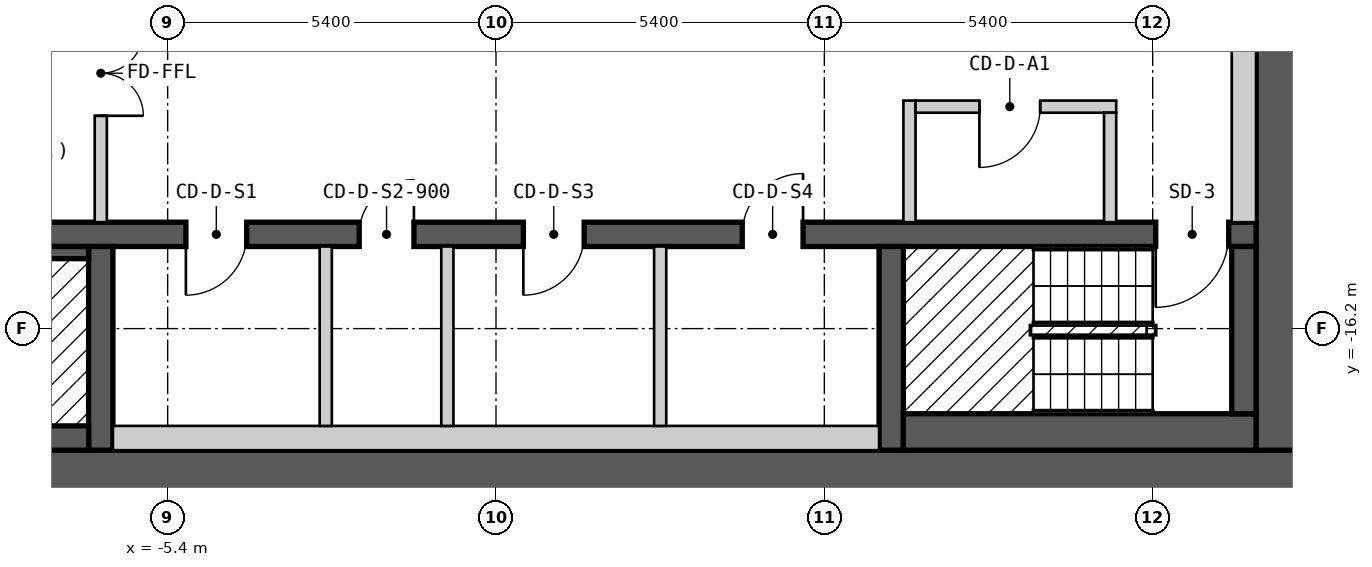
"""IFC4 building model, lengths in metres.
Left out: names, types, materials, properties, quantities, classifications, styles, units other than length and angle.
Written with IfcOpenShell. Run it as: python <this file> out.ifc"""

import sys

from ifc_helpers import new_model, si_unit, direction, frame, frame_2d, origin, place, context, subcontext, project, spatial, rectangle, extrude, element, fill, save


model = new_model("IFC4")
c1 = context("Model", 3, precision=1e-05, world=origin(), true_north=direction((0.0, 1.0)))
c2 = subcontext(c1, "Body", "Model", "MODEL_VIEW")
j1 = project(units=[si_unit("LENGTHUNIT", "METRE"), si_unit("PLANEANGLEUNIT", "RADIAN")], contexts=[c1])
p1 = place(None, origin())
s1 = spatial("IfcSite", under=j1, at=p1, CompositionType="ELEMENT")
p2 = place(p1, origin())
s2 = spatial("IfcBuilding", under=s1, at=p2, CompositionType="ELEMENT")
p3 = place(p2, frame((0.0, 0.0, 129.6)))
s3 = spatial("IfcBuildingStorey", under=s2, at=p3, CompositionType="ELEMENT", Elevation=129.6)
p4 = place(p3, frame((-13.3, -18.6, 0.0), z_axis=(0.0, 0.0, 1.0), x_axis=(1.0, 0.0, 0.0)))
e1 = element("IfcWall", 1, at=p4, inside=s3, PredefinedType="SHEAR", context=c2, shape_type="SweptSolid", body=[
    extrude(rectangle(XDim=26.6, YDim=0.8, at=frame_2d((13.3, 0.0))), origin(), (0.0, 0.0, 1.0), 2.7),
])
p5 = place(p3, frame((12.9, -18.2, 0.0), z_axis=(0.0, 0.0, 1.0), x_axis=(0.0, 1.0, 0.0)))
e2 = element("IfcWall", 2, at=p5, inside=s3, PredefinedType="SHEAR", context=c2, shape_type="SweptSolid", body=[
    extrude(rectangle(XDim=12.4, YDim=0.8, at=frame_2d((6.2, 0.0))), origin(), (0.0, 0.0, 1.0), 2.7),
])
p6 = place(p3, frame((-12.5, -14.65, 0.0), z_axis=(0.0, 0.0, 1.0), x_axis=(1.0, 0.0, 0.0)))
e3 = element("IfcWall", 3, at=p6, inside=s3, PredefinedType="SHEAR", context=c2, shape_type="SweptSolid", body=[
    extrude(rectangle(XDim=25.0, YDim=0.4, at=frame_2d((12.5, 0.0))), origin(), (0.0, 0.0, 1.0), 2.7),
])
p7 = place(p6, frame((1.7, 0.0, 0.0), z_axis=(0.0, 0.0, 1.0), x_axis=(-1.0, 0.0, 0.0)))
e4 = element("IfcOpeningElement", 4, at=p7, cuts=e3, PredefinedType="OPENING", context=c2, shape_type="SweptSolid", body=[
    extrude(rectangle(XDim=1.2, YDim=2.1, at=frame_2d((0.6, 1.05))), frame((0.0, 0.21, 0.0), z_axis=(0.0, -1.0, 0.0), x_axis=(1.0, 0.0, 0.0)), (0.0, 0.0, 1.0), 0.42),
])
p8 = place(p6, frame((24.55, 0.0, 0.0), z_axis=(0.0, 0.0, 1.0), x_axis=(-1.0, 0.0, 0.0)))
e5 = element("IfcOpeningElement", 5, at=p8, cuts=e3, PredefinedType="OPENING", context=c2, shape_type="SweptSolid", body=[
    extrude(rectangle(XDim=1.2, YDim=2.1, at=frame_2d((0.6, 1.05))), frame((0.0, 0.21, 0.0), z_axis=(0.0, -1.0, 0.0), x_axis=(1.0, 0.0, 0.0)), (0.0, 0.0, 1.0), 0.42),
])
p9 = place(p6, frame((8.4, 0.0, 0.0), z_axis=(0.0, 0.0, 1.0), x_axis=(-1.0, 0.0, 0.0)))
e6 = element("IfcOpeningElement", 6, at=p9, cuts=e3, PredefinedType="OPENING", context=c2, shape_type="SweptSolid", body=[
    extrude(rectangle(XDim=1.0, YDim=2.1, at=frame_2d((0.5, 1.05))), frame((0.0, 0.21, 0.0), z_axis=(0.0, -1.0, 0.0), x_axis=(1.0, 0.0, 0.0)), (0.0, 0.0, 1.0), 0.42),
])
p10 = place(p6, frame((11.15, 0.0, 0.0), z_axis=(0.0, 0.0, 1.0), x_axis=(-1.0, 0.0, 0.0)))
e7 = element("IfcOpeningElement", 7, at=p10, cuts=e3, PredefinedType="OPENING", context=c2, shape_type="SweptSolid", body=[
    extrude(rectangle(XDim=0.9, YDim=2.1, at=frame_2d((0.45, 1.05))), frame((0.0, 0.21, 0.0), z_axis=(0.0, -1.0, 0.0), x_axis=(1.0, 0.0, 0.0)), (0.0, 0.0, 1.0), 0.42),
])
p11 = place(p6, frame((13.95, 0.0, 0.0), z_axis=(0.0, 0.0, 1.0), x_axis=(-1.0, 0.0, 0.0)))
e8 = element("IfcOpeningElement", 8, at=p11, cuts=e3, PredefinedType="OPENING", context=c2, shape_type="SweptSolid", body=[
    extrude(rectangle(XDim=1.0, YDim=2.1, at=frame_2d((0.5, 1.05))), frame((0.0, 0.21, 0.0), z_axis=(0.0, -1.0, 0.0), x_axis=(1.0, 0.0, 0.0)), (0.0, 0.0, 1.0), 0.42),
])
p12 = place(p6, frame((17.55, 0.0, 0.0), z_axis=(0.0, 0.0, 1.0), x_axis=(-1.0, 0.0, 0.0)))
e9 = element("IfcOpeningElement", 9, at=p12, cuts=e3, PredefinedType="OPENING", context=c2, shape_type="SweptSolid", body=[
    extrude(rectangle(XDim=1.0, YDim=2.1, at=frame_2d((0.5, 1.05))), frame((0.0, 0.21, 0.0), z_axis=(0.0, -1.0, 0.0), x_axis=(1.0, 0.0, 0.0)), (0.0, 0.0, 1.0), 0.42),
])
for number, where, z_axis, x_axis in (
    (10, (-6.5, -18.2, 0.0), (0.0, 0.0, 1.0), (0.0, 1.0, 0.0)),
    (11, (6.5, -18.2, 0.0), (0.0, 0.0, 1.0), (0.0, 1.0, 0.0)),
):
    element("IfcWall", number, at=place(p3, frame(where, z_axis=z_axis, x_axis=x_axis)), inside=s3, PredefinedType="SHEAR", context=c2, shape_type="SweptSolid", body=[
        extrude(rectangle(XDim=3.35, YDim=0.4, at=frame_2d((1.675, 0.0))), origin(), (0.0, 0.0, 1.0), 2.7),
    ])
p13 = place(p3, frame((-12.1, -18.0, 0.0), z_axis=(0.0, 0.0, 1.0), x_axis=(1.0, 0.0, 0.0)))
e12 = element("IfcWall", 12, at=p13, inside=s3, PredefinedType="SOLIDWALL", context=c2, shape_type="SweptSolid", body=[
    extrude(rectangle(XDim=5.4, YDim=0.4, at=frame_2d((2.7, 0.0))), origin(), (0.0, 0.0, 1.0), 2.7),
])
p14 = place(p3, frame((-10.8, -14.95, 0.0), z_axis=(0.0, 0.0, 1.0), x_axis=(1.0, 0.0, 0.0)))
e13 = element("IfcWall", 13, at=p14, inside=s3, PredefinedType="SOLIDWALL", context=c2, shape_type="SweptSolid", body=[
    extrude(rectangle(XDim=4.1, YDim=0.2, at=frame_2d((2.05, 0.0))), origin(), (0.0, 0.0, 1.0), 2.7),
])
p15 = place(p3, frame((-6.5, -14.45, 0.0), z_axis=(0.0, 0.0, 1.0), x_axis=(0.0, 1.0, 0.0)))
e14 = element("IfcWall", 14, at=p15, inside=s3, PredefinedType="PARTITIONING", context=c2, shape_type="SweptSolid", body=[
    extrude(rectangle(XDim=4.9, YDim=0.2, at=frame_2d((2.45, 0.0))), origin(), (0.0, 0.0, 1.0), 2.7),
])
p16 = place(p15, frame((3.15, 0.0, 0.0), z_axis=(0.0, 0.0, 1.0), x_axis=(-1.0, 0.0, 0.0)))
e15 = element("IfcOpeningElement", 15, at=p16, cuts=e14, PredefinedType="OPENING", context=c2, shape_type="SweptSolid", body=[
    extrude(rectangle(XDim=1.4, YDim=2.1, at=frame_2d((0.7, 1.05))), frame((0.0, 0.11, 0.0), z_axis=(0.0, -1.0, 0.0), x_axis=(1.0, 0.0, 0.0)), (0.0, 0.0, 1.0), 0.22),
])
p17 = place(p3, frame((-6.3, -18.0, 0.0), z_axis=(0.0, 0.0, 1.0), x_axis=(1.0, 0.0, 0.0)))
e16 = element("IfcWall", 16, at=p17, inside=s3, PredefinedType="PARTITIONING", context=c2, shape_type="SweptSolid", body=[
    extrude(rectangle(XDim=12.6, YDim=0.4, at=frame_2d((6.3, 0.0))), origin(), (0.0, 0.0, 1.0), 2.7),
])
for number, where, z_axis, x_axis in (
    (17, (-2.8, -17.8, 0.0), (0.0, 0.0, 1.0), (0.0, 1.0, 0.0)),
    (18, (-0.8, -17.8, 0.0), (0.0, 0.0, 1.0), (0.0, 1.0, 0.0)),
    (19, (2.7, -17.8, 0.0), (0.0, 0.0, 1.0), (0.0, 1.0, 0.0)),
):
    element("IfcWall", number, at=place(p3, frame(where, z_axis=z_axis, x_axis=x_axis)), inside=s3, PredefinedType="PARTITIONING", context=c2, shape_type="SweptSolid", body=[
        extrude(rectangle(XDim=2.95, YDim=0.2, at=frame_2d((1.475, 0.0))), origin(), (0.0, 0.0, 1.0), 2.7),
    ])
p18 = place(p3, frame((6.7, -17.9, 0.0), z_axis=(0.0, 0.0, 1.0), x_axis=(1.0, 0.0, 0.0)))
e20 = element("IfcWall", 20, at=p18, inside=s3, PredefinedType="SOLIDWALL", context=c2, shape_type="SweptSolid", body=[
    extrude(rectangle(XDim=5.8, YDim=0.6, at=frame_2d((2.9, 0.0))), origin(), (0.0, 0.0, 1.0), 2.7),
])
p19 = place(p3, frame((6.8, -14.45, 0.0), z_axis=(0.0, 0.0, 1.0), x_axis=(0.0, 1.0, 0.0)))
e21 = element("IfcWall", 21, at=p19, inside=s3, PredefinedType="PARTITIONING", context=c2, shape_type="SweptSolid", body=[
    extrude(rectangle(XDim=2.0, YDim=0.2, at=frame_2d((1.0, 0.0))), origin(), (0.0, 0.0, 1.0), 2.7),
])
p20 = place(p3, frame((6.9, -12.55, 0.0), z_axis=(0.0, 0.0, 1.0), x_axis=(1.0, 0.0, 0.0)))
e22 = element("IfcWall", 22, at=p20, inside=s3, PredefinedType="PARTITIONING", context=c2, shape_type="SweptSolid", body=[
    extrude(rectangle(XDim=3.3, YDim=0.2, at=frame_2d((1.65, 0.0))), origin(), (0.0, 0.0, 1.0), 2.7),
])
p21 = place(p20, frame((2.05, 0.0, 0.0), z_axis=(0.0, 0.0, 1.0), x_axis=(-1.0, 0.0, 0.0)))
e23 = element("IfcOpeningElement", 23, at=p21, cuts=e22, PredefinedType="OPENING", context=c2, shape_type="SweptSolid", body=[
    extrude(rectangle(XDim=1.0, YDim=2.1, at=frame_2d((0.5, 1.05))), frame((0.0, 0.11, 0.0), z_axis=(0.0, -1.0, 0.0), x_axis=(1.0, 0.0, 0.0)), (0.0, 0.0, 1.0), 0.22),
])
p22 = place(p3, frame((10.1, -14.45, 0.0), z_axis=(0.0, 0.0, 1.0), x_axis=(0.0, 1.0, 0.0)))
e24 = element("IfcWall", 24, at=p22, inside=s3, PredefinedType="PARTITIONING", context=c2, shape_type="SweptSolid", body=[
    extrude(rectangle(XDim=1.8, YDim=0.2, at=frame_2d((0.9, 0.0))), origin(), (0.0, 0.0, 1.0), 2.7),
])
p23 = place(p3, frame((12.3, -17.6, 0.0), z_axis=(0.0, 0.0, 1.0), x_axis=(0.0, 1.0, 0.0)))
e25 = element("IfcWall", 25, at=p23, inside=s3, PredefinedType="SOLIDWALL", context=c2, shape_type="SweptSolid", body=[
    extrude(rectangle(XDim=2.75, YDim=0.4, at=frame_2d((1.375, 0.0))), origin(), (0.0, 0.0, 1.0), 2.7),
])
p24 = place(p3, frame((12.3, -14.45, 0.0), z_axis=(0.0, 0.0, 1.0), x_axis=(0.0, 1.0, 0.0)))
e26 = element("IfcWall", 26, at=p24, inside=s3, PredefinedType="PARTITIONING", context=c2, shape_type="SweptSolid", body=[
    extrude(rectangle(XDim=8.25, YDim=0.4, at=frame_2d((4.125, 0.0))), origin(), (0.0, 0.0, 1.0), 2.7),
])
p25 = place(p8, origin())
e27 = element("IfcDoor", 27, at=p25, inside=s3, OperationType="SINGLE_SWING_RIGHT", PredefinedType="DOOR", context=c2, shape_type="SweptSolid", body=[
    extrude(rectangle(XDim=1.2, YDim=2.1, at=frame_2d((0.6, 1.05))), frame((0.0, 0.025, 0.0), z_axis=(0.0, -1.0, 0.0), x_axis=(1.0, 0.0, 0.0)), (0.0, 0.0, 1.0), 0.05),
])
fill(e5, e27)
p26 = place(p16, origin())
e28 = element("IfcDoor", 28, at=p26, inside=s3, OperationType="DOUBLE_DOOR_SINGLE_SWING", PredefinedType="DOOR", context=c2, shape_type="SweptSolid", body=[
    extrude(rectangle(XDim=1.4, YDim=2.1, at=frame_2d((0.7, 1.05))), frame((0.0, 0.025, 0.0), z_axis=(0.0, -1.0, 0.0), x_axis=(1.0, 0.0, 0.0)), (0.0, 0.0, 1.0), 0.05),
])
fill(e15, e28)
p27 = place(p21, origin())
e29 = element("IfcDoor", 29, at=p27, inside=s3, OperationType="SINGLE_SWING_RIGHT", PredefinedType="DOOR", context=c2, shape_type="SweptSolid", body=[
    extrude(rectangle(XDim=1.0, YDim=2.1, at=frame_2d((0.5, 1.05))), frame((0.0, 0.025, 0.0), z_axis=(0.0, -1.0, 0.0), x_axis=(1.0, 0.0, 0.0)), (0.0, 0.0, 1.0), 0.05),
])
fill(e23, e29)
p28 = place(p9, origin())
e30 = element("IfcDoor", 30, at=p28, inside=s3, OperationType="SINGLE_SWING_RIGHT", PredefinedType="DOOR", context=c2, shape_type="SweptSolid", body=[
    extrude(rectangle(XDim=1.0, YDim=2.1, at=frame_2d((0.5, 1.05))), frame((0.0, 0.025, 0.0), z_axis=(0.0, -1.0, 0.0), x_axis=(1.0, 0.0, 0.0)), (0.0, 0.0, 1.0), 0.05),
])
fill(e6, e30)
p29 = place(p10, origin())
e31 = element("IfcDoor", 31, at=p29, inside=s3, OperationType="SINGLE_SWING_LEFT", PredefinedType="DOOR", context=c2, shape_type="SweptSolid", body=[
    extrude(rectangle(XDim=0.9, YDim=2.1, at=frame_2d((0.45, 1.05))), frame((0.0, 0.025, 0.0), z_axis=(0.0, -1.0, 0.0), x_axis=(1.0, 0.0, 0.0)), (0.0, 0.0, 1.0), 0.05),
])
fill(e7, e31)
p30 = place(p11, origin())
e32 = element("IfcDoor", 32, at=p30, inside=s3, OperationType="SINGLE_SWING_RIGHT", PredefinedType="DOOR", context=c2, shape_type="SweptSolid", body=[
    extrude(rectangle(XDim=1.0, YDim=2.1, at=frame_2d((0.5, 1.05))), frame((0.0, 0.025, 0.0), z_axis=(0.0, -1.0, 0.0), x_axis=(1.0, 0.0, 0.0)), (0.0, 0.0, 1.0), 0.05),
])
fill(e8, e32)
p31 = place(p12, origin())
e33 = element("IfcDoor", 33, at=p31, inside=s3, OperationType="SINGLE_SWING_LEFT", PredefinedType="DOOR", context=c2, shape_type="SweptSolid", body=[
    extrude(rectangle(XDim=1.0, YDim=2.1, at=frame_2d((0.5, 1.05))), frame((0.0, 0.025, 0.0), z_axis=(0.0, -1.0, 0.0), x_axis=(1.0, 0.0, 0.0)), (0.0, 0.0, 1.0), 0.05),
])
fill(e9, e33)
save(model, sys.argv[1])
